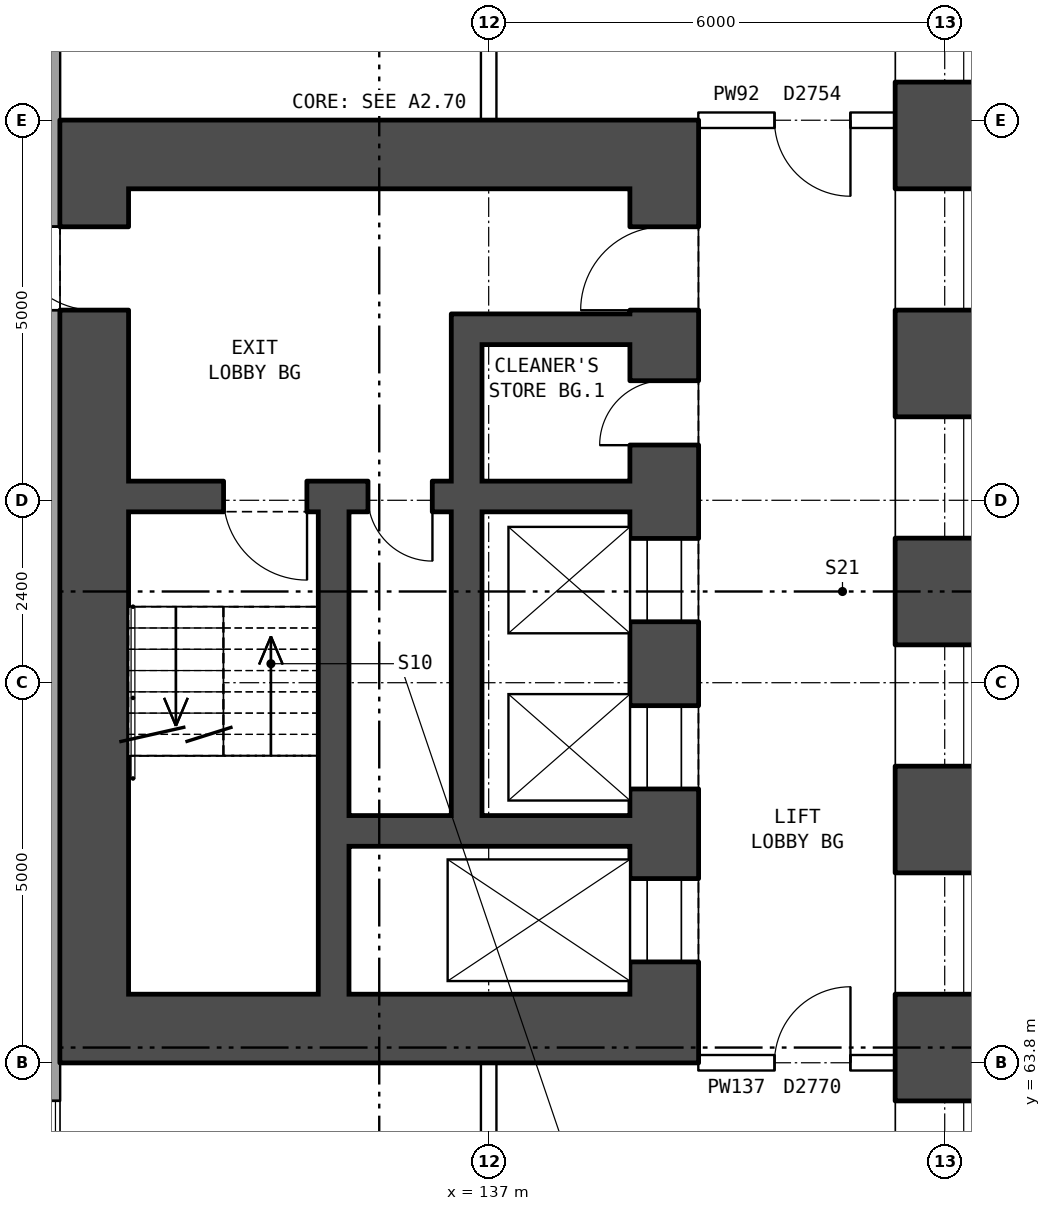
"""IFC4 building model, lengths in metres.
Left out: names, types, materials, properties, quantities, classifications, styles, units other than length and angle.
Written with IfcOpenShell. Run it as: python <this file> out.ifc"""

import sys

from ifc_helpers import new_model, si_unit, direction, frame, frame_2d, origin, place, context, subcontext, project, spatial, rectangle, extrude, element, fill, save


model = new_model("IFC4")
c1 = context("Model", 3, precision=1e-05, world=origin(), true_north=direction((0.0, 1.0)))
c2 = subcontext(c1, "Body", "Model", "MODEL_VIEW")
j1 = project(units=[si_unit("LENGTHUNIT", "METRE"), si_unit("PLANEANGLEUNIT", "RADIAN")], contexts=[c1])
p1 = place(None, origin())
s1 = spatial("IfcSite", under=j1, at=p1, CompositionType="ELEMENT")
p2 = place(p1, origin())
s2 = spatial("IfcBuilding", under=s1, at=p2, CompositionType="ELEMENT")
p3 = place(p2, origin())
s3 = spatial("IfcBuildingStorey", under=s2, at=p3, CompositionType="ELEMENT", Elevation=0.0)
p4 = place(p3, frame((142.95, 56.4, -0.35), z_axis=(0.0, 0.0, 1.0), x_axis=(0.0, 1.0, 0.0)))
e1 = element("IfcWall", 1, at=p4, inside=s3, PredefinedType="SHEAR", context=c2, shape_type="SweptSolid", body=[
    extrude(rectangle(XDim=27.2, YDim=1.2, at=frame_2d((13.6, 0.0))), origin(), (0.0, 0.0, 1.0), 5.55),
])
p5 = place(p4, frame((2.3, 0.0, 0.8)))
e2 = element("IfcOpeningElement", 2, at=p5, cuts=e1, PredefinedType="OPENING", context=c2, shape_type="SweptSolid", body=[
    extrude(rectangle(XDim=1.6, YDim=1.8, at=frame_2d((0.8, 0.9))), frame((0.0, 0.61, 0.0), z_axis=(0.0, -1.0, 0.0), x_axis=(1.0, 0.0, 0.0)), (0.0, 0.0, 1.0), 1.22),
])
p6 = place(p4, frame((5.3, 0.0, 0.8)))
e3 = element("IfcOpeningElement", 3, at=p6, cuts=e1, PredefinedType="OPENING", context=c2, shape_type="SweptSolid", body=[
    extrude(rectangle(XDim=1.6, YDim=1.8, at=frame_2d((0.8, 0.9))), frame((0.0, 0.61, 0.0), z_axis=(0.0, -1.0, 0.0), x_axis=(1.0, 0.0, 0.0)), (0.0, 0.0, 1.0), 1.22),
])
p7 = place(p4, frame((8.3, 0.0, 0.8)))
e4 = element("IfcOpeningElement", 4, at=p7, cuts=e1, PredefinedType="OPENING", context=c2, shape_type="SweptSolid", body=[
    extrude(rectangle(XDim=1.6, YDim=1.8, at=frame_2d((0.8, 0.9))), frame((0.0, 0.61, 0.0), z_axis=(0.0, -1.0, 0.0), x_axis=(1.0, 0.0, 0.0)), (0.0, 0.0, 1.0), 1.22),
])
p8 = place(p4, frame((11.3, 0.0, 0.8)))
e5 = element("IfcOpeningElement", 5, at=p8, cuts=e1, PredefinedType="OPENING", context=c2, shape_type="SweptSolid", body=[
    extrude(rectangle(XDim=1.6, YDim=1.8, at=frame_2d((0.8, 0.9))), frame((0.0, 0.61, 0.0), z_axis=(0.0, -1.0, 0.0), x_axis=(1.0, 0.0, 0.0)), (0.0, 0.0, 1.0), 1.22),
])
p9 = place(p4, frame((14.3, 0.0, 0.8)))
e6 = element("IfcOpeningElement", 6, at=p9, cuts=e1, PredefinedType="OPENING", context=c2, shape_type="SweptSolid", body=[
    extrude(rectangle(XDim=1.6, YDim=1.8, at=frame_2d((0.8, 0.9))), frame((0.0, 0.61, 0.0), z_axis=(0.0, -1.0, 0.0), x_axis=(1.0, 0.0, 0.0)), (0.0, 0.0, 1.0), 1.22),
])
p10 = place(p4, frame((17.3, 0.0, 0.8)))
e7 = element("IfcOpeningElement", 7, at=p10, cuts=e1, PredefinedType="OPENING", context=c2, shape_type="SweptSolid", body=[
    extrude(rectangle(XDim=1.6, YDim=1.8, at=frame_2d((0.8, 0.9))), frame((0.0, 0.61, 0.0), z_axis=(0.0, -1.0, 0.0), x_axis=(1.0, 0.0, 0.0)), (0.0, 0.0, 1.0), 1.22),
])
p11 = place(p4, frame((20.3, 0.0, 0.8)))
e8 = element("IfcOpeningElement", 8, at=p11, cuts=e1, PredefinedType="OPENING", context=c2, shape_type="SweptSolid", body=[
    extrude(rectangle(XDim=1.6, YDim=1.8, at=frame_2d((0.8, 0.9))), frame((0.0, 0.61, 0.0), z_axis=(0.0, -1.0, 0.0), x_axis=(1.0, 0.0, 0.0)), (0.0, 0.0, 1.0), 1.22),
])
p12 = place(p4, frame((23.3, 0.0, 0.8)))
e9 = element("IfcOpeningElement", 9, at=p12, cuts=e1, PredefinedType="OPENING", context=c2, shape_type="SweptSolid", body=[
    extrude(rectangle(XDim=1.6, YDim=1.8, at=frame_2d((0.8, 0.9))), frame((0.0, 0.61, 0.0), z_axis=(0.0, -1.0, 0.0), x_axis=(1.0, 0.0, 0.0)), (0.0, 0.0, 1.0), 1.22),
])
p13 = place(p3, frame((131.18, 82.925, 0.0), z_axis=(0.0, 0.0, 1.0), x_axis=(0.0, -1.0, 0.0)))
e10 = element("IfcWall", 10, at=p13, inside=s3, PredefinedType="STANDARD", context=c2, shape_type="SweptSolid", body=[
    extrude(rectangle(XDim=25.851, YDim=0.36, at=frame_2d((12.925, 0.0))), origin(), (0.0, 0.0, 1.0), 5.2),
])
p14 = place(p13, frame((19.625, 0.0, 0.8)))
e11 = element("IfcOpeningElement", 11, at=p14, cuts=e10, PredefinedType="OPENING", context=c2, shape_type="SweptSolid", body=[
    extrude(rectangle(XDim=1.6, YDim=1.8, at=frame_2d((0.8, 0.9))), frame((0.0, 0.19, 0.0), z_axis=(0.0, -1.0, 0.0), x_axis=(1.0, 0.0, 0.0)), (0.0, 0.0, 1.0), 0.38),
])
p15 = place(p13, frame((8.125, 0.0, 0.0)))
e12 = element("IfcOpeningElement", 12, at=p15, cuts=e10, PredefinedType="OPENING", context=c2, shape_type="SweptSolid", body=[
    extrude(rectangle(XDim=1.1, YDim=2.1, at=frame_2d((0.55, 1.05))), frame((0.0, 0.19, 0.0), z_axis=(0.0, -1.0, 0.0), x_axis=(1.0, 0.0, 0.0)), (0.0, 0.0, 1.0), 0.38),
])
p16 = place(p3, frame((139.31, 64.7, 0.0), z_axis=(0.0, 0.0, 1.0), x_axis=(0.0, 1.0, 0.0)))
e13 = element("IfcWall", 13, at=p16, inside=s3, PredefinedType="SHEAR", context=c2, shape_type="SweptSolid", body=[
    extrude(rectangle(XDim=10.6, YDim=0.9, at=frame_2d((5.3, 0.0))), origin(), (0.0, 0.0, 1.0), 5.2),
])
p17 = place(p16, frame((0.425, 0.0, 0.0)))
e14 = element("IfcOpeningElement", 14, at=p17, cuts=e13, PredefinedType="OPENING", context=c2, shape_type="SweptSolid", body=[
    extrude(rectangle(XDim=1.1, YDim=2.1, at=frame_2d((0.55, 1.05))), frame((0.0, 0.46, 0.0), z_axis=(0.0, -1.0, 0.0), x_axis=(1.0, 0.0, 0.0)), (0.0, 0.0, 1.0), 0.92),
])
p18 = place(p16, frame((2.7, 0.0, 0.0)))
e15 = element("IfcOpeningElement", 15, at=p18, cuts=e13, PredefinedType="OPENING", context=c2, shape_type="SweptSolid", body=[
    extrude(rectangle(XDim=1.1, YDim=2.1, at=frame_2d((0.55, 1.05))), frame((0.0, 0.46, 0.0), z_axis=(0.0, -1.0, 0.0), x_axis=(1.0, 0.0, 0.0)), (0.0, 0.0, 1.0), 0.92),
])
p19 = place(p16, frame((4.9, 0.0, 0.0)))
e16 = element("IfcOpeningElement", 16, at=p19, cuts=e13, PredefinedType="OPENING", context=c2, shape_type="SweptSolid", body=[
    extrude(rectangle(XDim=1.1, YDim=2.1, at=frame_2d((0.55, 1.05))), frame((0.0, 0.46, 0.0), z_axis=(0.0, -1.0, 0.0), x_axis=(1.0, 0.0, 0.0)), (0.0, 0.0, 1.0), 0.92),
])
p20 = place(p16, frame((9.0, 0.0, 0.0)))
e17 = element("IfcOpeningElement", 17, at=p20, cuts=e13, PredefinedType="OPENING", context=c2, shape_type="SweptSolid", body=[
    extrude(rectangle(XDim=1.1, YDim=2.1, at=frame_2d((0.55, 1.05))), frame((0.0, 0.46, 0.0), z_axis=(0.0, -1.0, 0.0), x_axis=(1.0, 0.0, 0.0)), (0.0, 0.0, 1.0), 0.92),
])
p21 = place(p16, frame((7.225, 0.0, 0.0)))
e18 = element("IfcOpeningElement", 18, at=p21, cuts=e13, PredefinedType="OPENING", context=c2, shape_type="SweptSolid", body=[
    extrude(rectangle(XDim=0.85, YDim=2.1, at=frame_2d((0.425, 1.05))), frame((0.0, 0.46, 0.0), z_axis=(0.0, -1.0, 0.0), x_axis=(1.0, 0.0, 0.0)), (0.0, 0.0, 1.0), 0.92),
])
p22 = place(p3, frame((131.81, 64.7, 0.0), z_axis=(0.0, 0.0, 1.0), x_axis=(0.0, 1.0, 0.0)))
e19 = element("IfcWall", 19, at=p22, inside=s3, PredefinedType="SHEAR", context=c2, shape_type="SweptSolid", body=[
    extrude(rectangle(XDim=10.6, YDim=0.9, at=frame_2d((5.3, 0.0))), origin(), (0.0, 0.0, 1.0), 5.2),
])
p23 = place(p22, frame((9.0, 0.0, 0.0)))
e20 = element("IfcOpeningElement", 20, at=p23, cuts=e19, PredefinedType="OPENING", context=c2, shape_type="SweptSolid", body=[
    extrude(rectangle(XDim=1.1, YDim=2.1, at=frame_2d((0.55, 1.05))), frame((0.0, 0.46, 0.0), z_axis=(0.0, -1.0, 0.0), x_axis=(1.0, 0.0, 0.0)), (0.0, 0.0, 1.0), 0.92),
])
for number, where, z_axis, x_axis in (
    (21, (139.76, 64.25, 0.0), (0.0, 0.0, 1.0), (-1.0, 0.0, 0.0)),
    (22, (139.76, 75.75, 0.0), (0.0, 0.0, 1.0), (-1.0, 0.0, 0.0)),
):
    element("IfcWall", number, at=place(p3, frame(where, z_axis=z_axis, x_axis=x_axis)), inside=s3, PredefinedType="SHEAR", context=c2, shape_type="SweptSolid", body=[
        extrude(rectangle(XDim=8.4, YDim=0.9, at=frame_2d((4.2, 0.0))), origin(), (0.0, 0.0, 1.0), 5.2),
    ])
p24 = place(p3, frame((138.86, 66.85, 0.0), z_axis=(0.0, 0.0, 1.0), x_axis=(-1.0, 0.0, 0.0)))
e23 = element("IfcWall", 23, at=p24, inside=s3, PredefinedType="SHEAR", context=c2, shape_type="SweptSolid", body=[
    extrude(rectangle(XDim=3.7, YDim=0.4, at=frame_2d((1.85, 0.0))), origin(), (0.0, 0.0, 1.0), 5.2),
])
p25 = place(p3, frame((138.86, 71.25, 0.0), z_axis=(0.0, 0.0, 1.0), x_axis=(-1.0, 0.0, 0.0)))
e24 = element("IfcWall", 24, at=p25, inside=s3, PredefinedType="SHEAR", context=c2, shape_type="SweptSolid", body=[
    extrude(rectangle(XDim=6.6, YDim=0.4, at=frame_2d((3.3, 0.0))), origin(), (0.0, 0.0, 1.0), 5.2),
])
p26 = place(p25, frame((4.25, 0.0, 0.0)))
e25 = element("IfcOpeningElement", 25, at=p26, cuts=e24, PredefinedType="OPENING", context=c2, shape_type="SweptSolid", body=[
    extrude(rectangle(XDim=1.1, YDim=2.1, at=frame_2d((0.55, 1.05))), frame((0.0, 0.21, 0.0), z_axis=(0.0, -1.0, 0.0), x_axis=(1.0, 0.0, 0.0)), (0.0, 0.0, 1.0), 0.42),
])
p27 = place(p25, frame((2.6, 0.0, 0.0)))
e26 = element("IfcOpeningElement", 26, at=p27, cuts=e24, PredefinedType="OPENING", context=c2, shape_type="SweptSolid", body=[
    extrude(rectangle(XDim=0.85, YDim=2.1, at=frame_2d((0.425, 1.05))), frame((0.0, 0.21, 0.0), z_axis=(0.0, -1.0, 0.0), x_axis=(1.0, 0.0, 0.0)), (0.0, 0.0, 1.0), 0.42),
])
p28 = place(p3, frame((138.86, 73.45, 0.0), z_axis=(0.0, 0.0, 1.0), x_axis=(-1.0, 0.0, 0.0)))
e27 = element("IfcWall", 27, at=p28, inside=s3, PredefinedType="SHEAR", context=c2, shape_type="SweptSolid", body=[
    extrude(rectangle(XDim=1.95, YDim=0.4, at=frame_2d((0.975, 0.0))), origin(), (0.0, 0.0, 1.0), 5.2),
])
p29 = place(p3, frame((136.71, 67.05, 0.0), z_axis=(0.0, 0.0, 1.0), x_axis=(0.0, 1.0, 0.0)))
e28 = element("IfcWall", 28, at=p29, inside=s3, PredefinedType="SHEAR", context=c2, shape_type="SweptSolid", body=[
    extrude(rectangle(XDim=4.0, YDim=0.4, at=frame_2d((2.0, 0.0))), origin(), (0.0, 0.0, 1.0), 5.2),
])
p30 = place(p3, frame((136.71, 71.45, 0.0), z_axis=(0.0, 0.0, 1.0), x_axis=(0.0, 1.0, 0.0)))
e29 = element("IfcWall", 29, at=p30, inside=s3, PredefinedType="SHEAR", context=c2, shape_type="SweptSolid", body=[
    extrude(rectangle(XDim=2.2, YDim=0.4, at=frame_2d((1.1, 0.0))), origin(), (0.0, 0.0, 1.0), 5.2),
])
p31 = place(p3, frame((134.96, 64.7, 0.0), z_axis=(0.0, 0.0, 1.0), x_axis=(0.0, 1.0, 0.0)))
e30 = element("IfcWall", 30, at=p31, inside=s3, PredefinedType="SHEAR", context=c2, shape_type="SweptSolid", body=[
    extrude(rectangle(XDim=6.35, YDim=0.4, at=frame_2d((3.175, 0.0))), origin(), (0.0, 0.0, 1.0), 5.2),
])
p32 = place(p3, frame((139.76, 63.8, 0.0), z_axis=(0.0, 0.0, 1.0), x_axis=(1.0, 0.0, 0.0)))
e31 = element("IfcWall", 31, at=p32, inside=s3, PredefinedType="PARTITIONING", context=c2, shape_type="SweptSolid", body=[
    extrude(rectangle(XDim=2.59, YDim=0.2, at=frame_2d((1.295, 0.0))), origin(), (0.0, 0.0, 1.0), 5.2),
])
p33 = place(p32, frame((1.0, 0.0, 0.0)))
e32 = element("IfcOpeningElement", 32, at=p33, cuts=e31, PredefinedType="OPENING", context=c2, shape_type="SweptSolid", body=[
    extrude(rectangle(XDim=1.0, YDim=2.1, at=frame_2d((0.5, 1.05))), frame((0.0, 0.11, 0.0), z_axis=(0.0, -1.0, 0.0), x_axis=(1.0, 0.0, 0.0)), (0.0, 0.0, 1.0), 0.22),
])
p34 = place(p3, frame((139.76, 76.2, 0.0), z_axis=(0.0, 0.0, 1.0), x_axis=(1.0, 0.0, 0.0)))
e33 = element("IfcWall", 33, at=p34, inside=s3, PredefinedType="PARTITIONING", context=c2, shape_type="SweptSolid", body=[
    extrude(rectangle(XDim=2.59, YDim=0.2, at=frame_2d((1.295, 0.0))), origin(), (0.0, 0.0, 1.0), 5.2),
])
p35 = place(p34, frame((1.0, 0.0, 0.0)))
e34 = element("IfcOpeningElement", 34, at=p35, cuts=e33, PredefinedType="OPENING", context=c2, shape_type="SweptSolid", body=[
    extrude(rectangle(XDim=1.0, YDim=2.1, at=frame_2d((0.5, 1.05))), frame((0.0, 0.11, 0.0), z_axis=(0.0, -1.0, 0.0), x_axis=(1.0, 0.0, 0.0)), (0.0, 0.0, 1.0), 0.22),
])
p36 = place(p3, frame((137.0, 54.24, 0.0), z_axis=(0.0, 0.0, 1.0), x_axis=(0.0, 1.0, 0.0)))
e35 = element("IfcWall", 35, at=p36, inside=s3, PredefinedType="PARTITIONING", context=c2, shape_type="SweptSolid", body=[
    extrude(rectangle(XDim=9.56, YDim=0.2, at=frame_2d((4.78, 0.0))), origin(), (0.0, 0.0, 1.0), 5.2),
])
p37 = place(p36, frame((2.74, 0.0, 0.0)))
e36 = element("IfcOpeningElement", 36, at=p37, cuts=e35, PredefinedType="OPENING", context=c2, shape_type="SweptSolid", body=[
    extrude(rectangle(XDim=1.2, YDim=2.1, at=frame_2d((0.6, 1.05))), frame((0.0, 0.11, 0.0), z_axis=(0.0, -1.0, 0.0), x_axis=(1.0, 0.0, 0.0)), (0.0, 0.0, 1.0), 0.22),
])
p38 = place(p3, frame((137.0, 76.2, 0.0), z_axis=(0.0, 0.0, 1.0), x_axis=(0.0, 1.0, 0.0)))
e37 = element("IfcWall", 37, at=p38, inside=s3, PredefinedType="PARTITIONING", context=c2, shape_type="SweptSolid", body=[
    extrude(rectangle(XDim=3.1, YDim=0.2, at=frame_2d((1.55, 0.0))), origin(), (0.0, 0.0, 1.0), 5.2),
])
p39 = place(p38, frame((1.0, 0.0, 0.0)))
e38 = element("IfcOpeningElement", 38, at=p39, cuts=e37, PredefinedType="OPENING", context=c2, shape_type="SweptSolid", body=[
    extrude(rectangle(XDim=1.0, YDim=2.1, at=frame_2d((0.5, 1.05))), frame((0.0, 0.11, 0.0), z_axis=(0.0, -1.0, 0.0), x_axis=(1.0, 0.0, 0.0)), (0.0, 0.0, 1.0), 0.22),
])
p40 = place(p14, origin())
e39 = element("IfcWindow", 39, at=p40, inside=s3, PartitioningType="SINGLE_PANEL", PredefinedType="WINDOW", context=c2, shape_type="SweptSolid", body=[
    extrude(rectangle(XDim=1.6, YDim=1.8, at=frame_2d((0.8, 0.9))), frame((0.0, 0.15, 0.0), z_axis=(0.0, -1.0, 0.0), x_axis=(1.0, 0.0, 0.0)), (0.0, 0.0, 1.0), 0.06),
])
fill(e11, e39)
p41 = place(p6, origin())
e40 = element("IfcWindow", 40, at=p41, inside=s3, PartitioningType="SINGLE_PANEL", PredefinedType="WINDOW", context=c2, shape_type="SweptSolid", body=[
    extrude(rectangle(XDim=1.6, YDim=1.8, at=frame_2d((0.8, 0.9))), frame((0.0, -0.27, 0.0), z_axis=(0.0, -1.0, 0.0), x_axis=(1.0, 0.0, 0.0)), (0.0, 0.0, 1.0), 0.06),
])
fill(e3, e40)
p42 = place(p7, origin())
e41 = element("IfcWindow", 41, at=p42, inside=s3, PartitioningType="SINGLE_PANEL", PredefinedType="WINDOW", context=c2, shape_type="SweptSolid", body=[
    extrude(rectangle(XDim=1.6, YDim=1.8, at=frame_2d((0.8, 0.9))), frame((0.0, -0.27, 0.0), z_axis=(0.0, -1.0, 0.0), x_axis=(1.0, 0.0, 0.0)), (0.0, 0.0, 1.0), 0.06),
])
fill(e4, e41)
p43 = place(p8, origin())
e42 = element("IfcWindow", 42, at=p43, inside=s3, PartitioningType="SINGLE_PANEL", PredefinedType="WINDOW", context=c2, shape_type="SweptSolid", body=[
    extrude(rectangle(XDim=1.6, YDim=1.8, at=frame_2d((0.8, 0.9))), frame((0.0, -0.27, 0.0), z_axis=(0.0, -1.0, 0.0), x_axis=(1.0, 0.0, 0.0)), (0.0, 0.0, 1.0), 0.06),
])
fill(e5, e42)
p44 = place(p9, origin())
e43 = element("IfcWindow", 43, at=p44, inside=s3, PartitioningType="SINGLE_PANEL", PredefinedType="WINDOW", context=c2, shape_type="SweptSolid", body=[
    extrude(rectangle(XDim=1.6, YDim=1.8, at=frame_2d((0.8, 0.9))), frame((0.0, -0.27, 0.0), z_axis=(0.0, -1.0, 0.0), x_axis=(1.0, 0.0, 0.0)), (0.0, 0.0, 1.0), 0.06),
])
fill(e6, e43)
p45 = place(p10, origin())
e44 = element("IfcWindow", 44, at=p45, inside=s3, PartitioningType="SINGLE_PANEL", PredefinedType="WINDOW", context=c2, shape_type="SweptSolid", body=[
    extrude(rectangle(XDim=1.6, YDim=1.8, at=frame_2d((0.8, 0.9))), frame((0.0, -0.27, 0.0), z_axis=(0.0, -1.0, 0.0), x_axis=(1.0, 0.0, 0.0)), (0.0, 0.0, 1.0), 0.06),
])
fill(e7, e44)
p46 = place(p11, origin())
e45 = element("IfcWindow", 45, at=p46, inside=s3, PartitioningType="SINGLE_PANEL", PredefinedType="WINDOW", context=c2, shape_type="SweptSolid", body=[
    extrude(rectangle(XDim=1.6, YDim=1.8, at=frame_2d((0.8, 0.9))), frame((0.0, -0.27, 0.0), z_axis=(0.0, -1.0, 0.0), x_axis=(1.0, 0.0, 0.0)), (0.0, 0.0, 1.0), 0.06),
])
fill(e8, e45)
p47 = place(p17, origin())
e46 = element("IfcDoor", 46, at=p47, inside=s3, OperationType="DOUBLE_DOOR_SLIDING", PredefinedType="DOOR", context=c2, shape_type="SweptSolid", body=[
    extrude(rectangle(XDim=1.1, YDim=2.1, at=frame_2d((0.55, 1.05))), frame((0.0, 0.435, 0.0), z_axis=(0.0, -1.0, 0.0), x_axis=(1.0, 0.0, 0.0)), (0.0, 0.0, 1.0), 0.05),
])
fill(e14, e46)
p48 = place(p18, origin())
e47 = element("IfcDoor", 47, at=p48, inside=s3, OperationType="DOUBLE_DOOR_SLIDING", PredefinedType="DOOR", context=c2, shape_type="SweptSolid", body=[
    extrude(rectangle(XDim=1.1, YDim=2.1, at=frame_2d((0.55, 1.05))), frame((0.0, 0.435, 0.0), z_axis=(0.0, -1.0, 0.0), x_axis=(1.0, 0.0, 0.0)), (0.0, 0.0, 1.0), 0.05),
])
fill(e15, e47)
p49 = place(p19, origin())
e48 = element("IfcDoor", 48, at=p49, inside=s3, OperationType="DOUBLE_DOOR_SLIDING", PredefinedType="DOOR", context=c2, shape_type="SweptSolid", body=[
    extrude(rectangle(XDim=1.1, YDim=2.1, at=frame_2d((0.55, 1.05))), frame((0.0, 0.435, 0.0), z_axis=(0.0, -1.0, 0.0), x_axis=(1.0, 0.0, 0.0)), (0.0, 0.0, 1.0), 0.05),
])
fill(e16, e48)
p50 = place(p20, origin())
e49 = element("IfcDoor", 49, at=p50, inside=s3, OperationType="SINGLE_SWING_LEFT", PredefinedType="DOOR", context=c2, shape_type="SweptSolid", body=[
    extrude(rectangle(XDim=1.1, YDim=2.1, at=frame_2d((0.55, 1.05))), frame((0.0, 0.025, 0.0), z_axis=(0.0, -1.0, 0.0), x_axis=(1.0, 0.0, 0.0)), (0.0, 0.0, 1.0), 0.05),
])
fill(e17, e49)
p51 = place(p26, origin())
e50 = element("IfcDoor", 50, at=p51, inside=s3, OperationType="SINGLE_SWING_LEFT", PredefinedType="DOOR", context=c2, shape_type="SweptSolid", body=[
    extrude(rectangle(XDim=1.1, YDim=2.1, at=frame_2d((0.55, 1.05))), frame((0.0, 0.025, 0.0), z_axis=(0.0, -1.0, 0.0), x_axis=(1.0, 0.0, 0.0)), (0.0, 0.0, 1.0), 0.05),
])
fill(e25, e50)
p52 = place(p21, origin())
e51 = element("IfcDoor", 51, at=p52, inside=s3, OperationType="SINGLE_SWING_LEFT", PredefinedType="DOOR", context=c2, shape_type="SweptSolid", body=[
    extrude(rectangle(XDim=0.85, YDim=2.1, at=frame_2d((0.425, 1.05))), frame((0.0, 0.435, 0.0), z_axis=(0.0, -1.0, 0.0), x_axis=(1.0, 0.0, 0.0)), (0.0, 0.0, 1.0), 0.05),
])
fill(e18, e51)
p53 = place(p27, origin())
e52 = element("IfcDoor", 52, at=p53, inside=s3, OperationType="SINGLE_SWING_LEFT", PredefinedType="DOOR", context=c2, shape_type="SweptSolid", body=[
    extrude(rectangle(XDim=0.85, YDim=2.1, at=frame_2d((0.425, 1.05))), frame((0.0, 0.025, 0.0), z_axis=(0.0, -1.0, 0.0), x_axis=(1.0, 0.0, 0.0)), (0.0, 0.0, 1.0), 0.05),
])
fill(e26, e52)
p54 = place(p23, origin())
e53 = element("IfcDoor", 53, at=p54, inside=s3, OperationType="SINGLE_SWING_RIGHT", PredefinedType="DOOR", context=c2, shape_type="SweptSolid", body=[
    extrude(rectangle(XDim=1.1, YDim=2.1, at=frame_2d((0.55, 1.05))), frame((0.0, -0.385, 0.0), z_axis=(0.0, -1.0, 0.0), x_axis=(1.0, 0.0, 0.0)), (0.0, 0.0, 1.0), 0.05),
])
fill(e20, e53)
p55 = place(p33, origin())
e54 = element("IfcDoor", 54, at=p55, inside=s3, OperationType="SINGLE_SWING_RIGHT", PredefinedType="DOOR", context=c2, shape_type="SweptSolid", body=[
    extrude(rectangle(XDim=1.0, YDim=2.1, at=frame_2d((0.5, 1.05))), frame((0.0, 0.025, 0.0), z_axis=(0.0, -1.0, 0.0), x_axis=(1.0, 0.0, 0.0)), (0.0, 0.0, 1.0), 0.05),
])
fill(e32, e54)
p56 = place(p35, frame((1.0, 0.0, 0.0), z_axis=(0.0, 0.0, 1.0), x_axis=(-1.0, 0.0, 0.0)))
e55 = element("IfcDoor", 55, at=p56, inside=s3, OperationType="SINGLE_SWING_LEFT", PredefinedType="DOOR", context=c2, shape_type="SweptSolid", body=[
    extrude(rectangle(XDim=1.0, YDim=2.1, at=frame_2d((0.5, 1.05))), frame((0.0, 0.025, 0.0), z_axis=(0.0, -1.0, 0.0), x_axis=(1.0, 0.0, 0.0)), (0.0, 0.0, 1.0), 0.05),
])
fill(e34, e55)
save(model, sys.argv[1])
